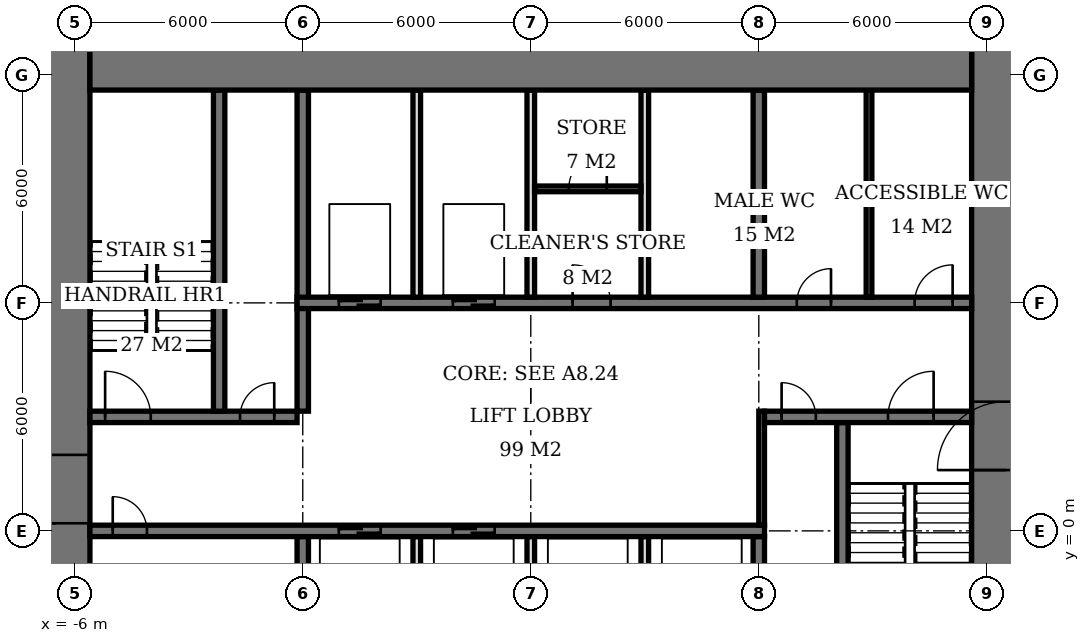
"""IFC4 building model, lengths in metres.
Left out: names, types, materials, properties, quantities, classifications, styles, units other than length and angle.
Written with IfcOpenShell. Run it as: python <this file> out.ifc"""

import sys

from ifc_helpers import new_model, si_unit, direction, frame, frame_2d, origin, place, context, subcontext, project, spatial, rectangle, extrude, element, fill, save


model = new_model("IFC4")
c1 = context("Model", 3, precision=1e-05, world=origin(), true_north=direction((0.0, 1.0)))
c2 = subcontext(c1, "Body", "Model", "MODEL_VIEW")
j1 = project(units=[si_unit("LENGTHUNIT", "METRE"), si_unit("PLANEANGLEUNIT", "RADIAN")], contexts=[c1])
p1 = place(None, origin())
s1 = spatial("IfcSite", under=j1, at=p1, CompositionType="ELEMENT")
p2 = place(p1, origin())
s2 = spatial("IfcBuilding", under=s1, at=p2, CompositionType="ELEMENT")
p3 = place(p2, frame((0.0, 0.0, 160.1)))
s3 = spatial("IfcBuildingStorey", under=s2, at=p3, CompositionType="ELEMENT", Elevation=160.1)
p4 = place(p3, frame((-5.6, 12.6, 0.0), z_axis=(0.0, 0.0, 1.0), x_axis=(1.0, 0.0, 0.0)))
e1 = element("IfcWall", 1, at=p4, inside=s3, PredefinedType="SHEAR", context=c2, shape_type="SweptSolid", body=[
    extrude(rectangle(XDim=23.2, YDim=2.0, at=frame_2d((11.6, 0.0))), origin(), (0.0, 0.0, 1.0), 3.9),
])
p5 = place(p3, frame((-6.5, -7.6, 0.0), z_axis=(0.0, 0.0, 1.0), x_axis=(0.0, 1.0, 0.0)))
e2 = element("IfcWall", 2, at=p5, inside=s3, PredefinedType="SHEAR", context=c2, shape_type="SweptSolid", body=[
    extrude(rectangle(XDim=21.2, YDim=1.8, at=frame_2d((10.6, 0.0))), origin(), (0.0, 0.0, 1.0), 3.9),
])
p6 = place(p5, frame((7.8, 0.0, 0.0)))
e3 = element("IfcOpeningElement", 3, at=p6, cuts=e2, PredefinedType="OPENING", context=c2, shape_type="SweptSolid", body=[
    extrude(rectangle(XDim=1.8, YDim=2.4, at=frame_2d((0.9, 1.2))), frame((0.0, 0.91, 0.0), z_axis=(0.0, -1.0, 0.0), x_axis=(1.0, 0.0, 0.0)), (0.0, 0.0, 1.0), 1.82),
])
p7 = place(p3, frame((18.5, -7.6, 0.0), z_axis=(0.0, 0.0, 1.0), x_axis=(0.0, 1.0, 0.0)))
e4 = element("IfcWall", 4, at=p7, inside=s3, PredefinedType="SHEAR", context=c2, shape_type="SweptSolid", body=[
    extrude(rectangle(XDim=21.2, YDim=1.8, at=frame_2d((10.6, 0.0))), origin(), (0.0, 0.0, 1.0), 3.9),
])
p8 = place(p7, frame((9.2, 0.0, 0.0)))
e5 = element("IfcOpeningElement", 5, at=p8, cuts=e4, PredefinedType="OPENING", context=c2, shape_type="SweptSolid", body=[
    extrude(rectangle(XDim=1.8, YDim=2.4, at=frame_2d((0.9, 1.2))), frame((0.0, 0.91, 0.0), z_axis=(0.0, -1.0, 0.0), x_axis=(1.0, 0.0, 0.0)), (0.0, 0.0, 1.0), 1.82),
])
p9 = place(p3, frame((-5.6, 0.0, 0.0), z_axis=(0.0, 0.0, 1.0), x_axis=(1.0, 0.0, 0.0)))
e6 = element("IfcWall", 6, at=p9, inside=s3, PredefinedType="SHEAR", context=c2, shape_type="SweptSolid", body=[
    extrude(rectangle(XDim=17.75, YDim=0.3, at=frame_2d((8.875, 0.0))), origin(), (0.0, 0.0, 1.0), 3.9),
])
p10 = place(p9, frame((0.6, 0.0, 0.0)))
e7 = element("IfcOpeningElement", 7, at=p10, cuts=e6, PredefinedType="OPENING", context=c2, shape_type="SweptSolid", body=[
    extrude(rectangle(XDim=0.9, YDim=2.1, at=frame_2d((0.45, 1.05))), frame((0.0, 0.16, 0.0), z_axis=(0.0, -1.0, 0.0), x_axis=(1.0, 0.0, 0.0)), (0.0, 0.0, 1.0), 0.32),
])
p11 = place(p9, frame((6.55, 0.0, 0.0)))
e8 = element("IfcOpeningElement", 8, at=p11, cuts=e6, PredefinedType="OPENING", context=c2, shape_type="SweptSolid", body=[
    extrude(rectangle(XDim=1.1, YDim=2.1, at=frame_2d((0.55, 1.05))), frame((0.0, 0.16, 0.0), z_axis=(0.0, -1.0, 0.0), x_axis=(1.0, 0.0, 0.0)), (0.0, 0.0, 1.0), 0.32),
])
p12 = place(p9, frame((9.55, 0.0, 0.0)))
e9 = element("IfcOpeningElement", 9, at=p12, cuts=e6, PredefinedType="OPENING", context=c2, shape_type="SweptSolid", body=[
    extrude(rectangle(XDim=1.1, YDim=2.1, at=frame_2d((0.55, 1.05))), frame((0.0, 0.16, 0.0), z_axis=(0.0, -1.0, 0.0), x_axis=(1.0, 0.0, 0.0)), (0.0, 0.0, 1.0), 0.32),
])
p13 = place(p3, frame((-5.6, 3.0, 0.0), z_axis=(0.0, 0.0, 1.0), x_axis=(1.0, 0.0, 0.0)))
e10 = element("IfcWall", 10, at=p13, inside=s3, PredefinedType="SHEAR", context=c2, shape_type="SweptSolid", body=[
    extrude(rectangle(XDim=5.45, YDim=0.3, at=frame_2d((2.725, 0.0))), origin(), (0.0, 0.0, 1.0), 3.9),
])
p14 = place(p13, frame((0.4, 0.0, 0.0)))
e11 = element("IfcOpeningElement", 11, at=p14, cuts=e10, PredefinedType="OPENING", context=c2, shape_type="SweptSolid", body=[
    extrude(rectangle(XDim=1.2, YDim=2.1, at=frame_2d((0.6, 1.05))), frame((0.0, 0.16, 0.0), z_axis=(0.0, -1.0, 0.0), x_axis=(1.0, 0.0, 0.0)), (0.0, 0.0, 1.0), 0.32),
])
p15 = place(p13, frame((3.95, 0.0, 0.0)))
e12 = element("IfcOpeningElement", 12, at=p15, cuts=e10, PredefinedType="OPENING", context=c2, shape_type="SweptSolid", body=[
    extrude(rectangle(XDim=0.9, YDim=2.1, at=frame_2d((0.45, 1.05))), frame((0.0, 0.16, 0.0), z_axis=(0.0, -1.0, 0.0), x_axis=(1.0, 0.0, 0.0)), (0.0, 0.0, 1.0), 0.32),
])
p16 = place(p3, frame((12.15, 3.0, 0.0), z_axis=(0.0, 0.0, 1.0), x_axis=(1.0, 0.0, 0.0)))
e13 = element("IfcWall", 13, at=p16, inside=s3, PredefinedType="SHEAR", context=c2, shape_type="SweptSolid", body=[
    extrude(rectangle(XDim=5.45, YDim=0.3, at=frame_2d((2.725, 0.0))), origin(), (0.0, 0.0, 1.0), 3.9),
])
p17 = place(p16, frame((3.25, 0.0, 0.0)))
e14 = element("IfcOpeningElement", 14, at=p17, cuts=e13, PredefinedType="OPENING", context=c2, shape_type="SweptSolid", body=[
    extrude(rectangle(XDim=1.2, YDim=2.1, at=frame_2d((0.6, 1.05))), frame((0.0, 0.16, 0.0), z_axis=(0.0, -1.0, 0.0), x_axis=(1.0, 0.0, 0.0)), (0.0, 0.0, 1.0), 0.32),
])
p18 = place(p16, frame((0.45, 0.0, 0.0)))
e15 = element("IfcOpeningElement", 15, at=p18, cuts=e13, PredefinedType="OPENING", context=c2, shape_type="SweptSolid", body=[
    extrude(rectangle(XDim=0.9, YDim=2.1, at=frame_2d((0.45, 1.05))), frame((0.0, 0.16, 0.0), z_axis=(0.0, -1.0, 0.0), x_axis=(1.0, 0.0, 0.0)), (0.0, 0.0, 1.0), 0.32),
])
p19 = place(p3, frame((-0.15, 6.0, 0.0), z_axis=(0.0, 0.0, 1.0), x_axis=(1.0, 0.0, 0.0)))
e16 = element("IfcWall", 16, at=p19, inside=s3, PredefinedType="SHEAR", context=c2, shape_type="SweptSolid", body=[
    extrude(rectangle(XDim=17.75, YDim=0.3, at=frame_2d((8.875, 0.0))), origin(), (0.0, 0.0, 1.0), 3.9),
])
p20 = place(p19, frame((13.15, 0.0, 0.0)))
e17 = element("IfcOpeningElement", 17, at=p20, cuts=e16, PredefinedType="OPENING", context=c2, shape_type="SweptSolid", body=[
    extrude(rectangle(XDim=0.9, YDim=2.1, at=frame_2d((0.45, 1.05))), frame((0.0, 0.16, 0.0), z_axis=(0.0, -1.0, 0.0), x_axis=(1.0, 0.0, 0.0)), (0.0, 0.0, 1.0), 0.32),
])
p21 = place(p19, frame((16.25, 0.0, 0.0)))
e18 = element("IfcOpeningElement", 18, at=p21, cuts=e16, PredefinedType="OPENING", context=c2, shape_type="SweptSolid", body=[
    extrude(rectangle(XDim=1.0, YDim=2.1, at=frame_2d((0.5, 1.05))), frame((0.0, 0.16, 0.0), z_axis=(0.0, -1.0, 0.0), x_axis=(1.0, 0.0, 0.0)), (0.0, 0.0, 1.0), 0.32),
])
p22 = place(p19, frame((7.25, 0.0, 0.0)))
e19 = element("IfcOpeningElement", 19, at=p22, cuts=e16, PredefinedType="OPENING", context=c2, shape_type="SweptSolid", body=[
    extrude(rectangle(XDim=1.0, YDim=2.1, at=frame_2d((0.5, 1.05))), frame((0.0, 0.16, 0.0), z_axis=(0.0, -1.0, 0.0), x_axis=(1.0, 0.0, 0.0)), (0.0, 0.0, 1.0), 0.32),
])
p23 = place(p19, frame((1.1, 0.0, 0.0)))
e20 = element("IfcOpeningElement", 20, at=p23, cuts=e16, PredefinedType="OPENING", context=c2, shape_type="SweptSolid", body=[
    extrude(rectangle(XDim=1.1, YDim=2.1, at=frame_2d((0.55, 1.05))), frame((0.0, 0.16, 0.0), z_axis=(0.0, -1.0, 0.0), x_axis=(1.0, 0.0, 0.0)), (0.0, 0.0, 1.0), 0.32),
])
p24 = place(p19, frame((4.1, 0.0, 0.0)))
e21 = element("IfcOpeningElement", 21, at=p24, cuts=e16, PredefinedType="OPENING", context=c2, shape_type="SweptSolid", body=[
    extrude(rectangle(XDim=1.1, YDim=2.1, at=frame_2d((0.55, 1.05))), frame((0.0, 0.16, 0.0), z_axis=(0.0, -1.0, 0.0), x_axis=(1.0, 0.0, 0.0)), (0.0, 0.0, 1.0), 0.32),
])
p25 = place(p3, frame((0.0, -5.6, 0.0), z_axis=(0.0, 0.0, 1.0), x_axis=(0.0, 1.0, 0.0)))
e22 = element("IfcWall", 22, at=p25, inside=s3, PredefinedType="SHEAR", context=c2, shape_type="SweptSolid", body=[
    extrude(rectangle(XDim=5.45, YDim=0.3, at=frame_2d((2.725, 0.0))), origin(), (0.0, 0.0, 1.0), 3.9),
])
p26 = place(p3, frame((0.0, 3.15, 0.0), z_axis=(0.0, 0.0, 1.0), x_axis=(0.0, 1.0, 0.0)))
e23 = element("IfcWall", 23, at=p26, inside=s3, PredefinedType="SHEAR", context=c2, shape_type="SweptSolid", body=[
    extrude(rectangle(XDim=8.45, YDim=0.3, at=frame_2d((4.225, 0.0))), origin(), (0.0, 0.0, 1.0), 3.9),
])
for number, where, z_axis, x_axis in (
    (24, (12.0, -5.6, 0.0), (0.0, 0.0, 1.0), (0.0, 1.0, 0.0)),
    (25, (12.0, 6.15, 0.0), (0.0, 0.0, 1.0), (0.0, 1.0, 0.0)),
):
    element("IfcWall", number, at=place(p3, frame(where, z_axis=z_axis, x_axis=x_axis)), inside=s3, PredefinedType="SHEAR", context=c2, shape_type="SweptSolid", body=[
        extrude(rectangle(XDim=5.45, YDim=0.3, at=frame_2d((2.725, 0.0))), origin(), (0.0, 0.0, 1.0), 3.9),
    ])
for number, where, z_axis, x_axis in (
    (26, (-2.2, 3.15, 0.0), (0.0, 0.0, 1.0), (0.0, 1.0, 0.0)),
    (27, (14.2, -5.6, 0.0), (0.0, 0.0, 1.0), (0.0, 1.0, 0.0)),
):
    element("IfcWall", number, at=place(p3, frame(where, z_axis=z_axis, x_axis=x_axis)), inside=s3, PredefinedType="SHEAR", context=c2, shape_type="SweptSolid", body=[
        extrude(rectangle(XDim=8.45, YDim=0.3, at=frame_2d((4.225, 0.0))), origin(), (0.0, 0.0, 1.0), 3.9),
    ])
for number, where, z_axis, x_axis in (
    (28, (3.0, 6.15, 0.0), (0.0, 0.0, 1.0), (0.0, 1.0, 0.0)),
    (29, (6.0, 6.15, 0.0), (0.0, 0.0, 1.0), (0.0, 1.0, 0.0)),
    (30, (9.0, 6.15, 0.0), (0.0, 0.0, 1.0), (0.0, 1.0, 0.0)),
    (31, (3.0, -5.6, 0.0), (0.0, 0.0, 1.0), (0.0, 1.0, 0.0)),
    (32, (6.0, -5.6, 0.0), (0.0, 0.0, 1.0), (0.0, 1.0, 0.0)),
    (33, (9.0, -5.6, 0.0), (0.0, 0.0, 1.0), (0.0, 1.0, 0.0)),
):
    element("IfcWall", number, at=place(p3, frame(where, z_axis=z_axis, x_axis=x_axis)), inside=s3, PredefinedType="SOLIDWALL", context=c2, shape_type="SweptSolid", body=[
        extrude(rectangle(XDim=5.45, YDim=0.2, at=frame_2d((2.725, 0.0))), origin(), (0.0, 0.0, 1.0), 3.9),
    ])
p27 = place(p3, frame((14.9, 6.15, 0.0), z_axis=(0.0, 0.0, 1.0), x_axis=(0.0, 1.0, 0.0)))
e34 = element("IfcWall", 34, at=p27, inside=s3, PredefinedType="PLUMBINGWALL", context=c2, shape_type="SweptSolid", body=[
    extrude(rectangle(XDim=5.45, YDim=0.15, at=frame_2d((2.725, 0.0))), origin(), (0.0, 0.0, 1.0), 3.65),
])
p28 = place(p3, frame((6.1, 9.0, 0.0), z_axis=(0.0, 0.0, 1.0), x_axis=(1.0, 0.0, 0.0)))
e35 = element("IfcWall", 35, at=p28, inside=s3, PredefinedType="PARTITIONING", context=c2, shape_type="SweptSolid", body=[
    extrude(rectangle(XDim=2.8, YDim=0.15, at=frame_2d((1.4, 0.0))), origin(), (0.0, 0.0, 1.0), 3.65),
])
p29 = place(p28, frame((0.9, 0.0, 0.0)))
e36 = element("IfcOpeningElement", 36, at=p29, cuts=e35, PredefinedType="OPENING", context=c2, shape_type="SweptSolid", body=[
    extrude(rectangle(XDim=1.0, YDim=2.1, at=frame_2d((0.5, 1.05))), frame((0.0, 0.085, 0.0), z_axis=(0.0, -1.0, 0.0), x_axis=(1.0, 0.0, 0.0)), (0.0, 0.0, 1.0), 0.17),
])
p30 = place(p3, frame((12.075, 0.15, 0.0), z_axis=(0.0, 0.0, 1.0), x_axis=(0.0, 1.0, 0.0)))
e37 = element("IfcWall", 37, at=p30, inside=s3, PredefinedType="PARTITIONING", context=c2, shape_type="SweptSolid", body=[
    extrude(rectangle(XDim=3.0, YDim=0.15, at=frame_2d((1.5, 0.0))), origin(), (0.0, 0.0, 1.0), 3.65),
])
p31 = place(p6, origin())
e38 = element("IfcDoor", 38, at=p31, inside=s3, OperationType="DOUBLE_DOOR_SINGLE_SWING", PredefinedType="DOOR", context=c2, shape_type="SweptSolid", body=[
    extrude(rectangle(XDim=1.8, YDim=2.4, at=frame_2d((0.9, 1.2))), frame((0.0, 0.025, 0.0), z_axis=(0.0, -1.0, 0.0), x_axis=(1.0, 0.0, 0.0)), (0.0, 0.0, 1.0), 0.05),
])
fill(e3, e38)
p32 = place(p8, origin())
e39 = element("IfcDoor", 39, at=p32, inside=s3, OperationType="DOUBLE_DOOR_SINGLE_SWING", PredefinedType="DOOR", context=c2, shape_type="SweptSolid", body=[
    extrude(rectangle(XDim=1.8, YDim=2.4, at=frame_2d((0.9, 1.2))), frame((0.0, 0.025, 0.0), z_axis=(0.0, -1.0, 0.0), x_axis=(1.0, 0.0, 0.0)), (0.0, 0.0, 1.0), 0.05),
])
fill(e5, e39)
p33 = place(p14, origin())
e40 = element("IfcDoor", 40, at=p33, inside=s3, OperationType="SINGLE_SWING_LEFT", PredefinedType="DOOR", context=c2, shape_type="SweptSolid", body=[
    extrude(rectangle(XDim=1.2, YDim=2.1, at=frame_2d((0.6, 1.05))), frame((0.0, 0.025, 0.0), z_axis=(0.0, -1.0, 0.0), x_axis=(1.0, 0.0, 0.0)), (0.0, 0.0, 1.0), 0.05),
])
fill(e11, e40)
p34 = place(p15, origin())
e41 = element("IfcDoor", 41, at=p34, inside=s3, OperationType="SINGLE_SWING_RIGHT", PredefinedType="DOOR", context=c2, shape_type="SweptSolid", body=[
    extrude(rectangle(XDim=0.9, YDim=2.1, at=frame_2d((0.45, 1.05))), frame((0.0, 0.025, 0.0), z_axis=(0.0, -1.0, 0.0), x_axis=(1.0, 0.0, 0.0)), (0.0, 0.0, 1.0), 0.05),
])
fill(e12, e41)
p35 = place(p17, origin())
e42 = element("IfcDoor", 42, at=p35, inside=s3, OperationType="SINGLE_SWING_RIGHT", PredefinedType="DOOR", context=c2, shape_type="SweptSolid", body=[
    extrude(rectangle(XDim=1.2, YDim=2.1, at=frame_2d((0.6, 1.05))), frame((0.0, 0.025, 0.0), z_axis=(0.0, -1.0, 0.0), x_axis=(1.0, 0.0, 0.0)), (0.0, 0.0, 1.0), 0.05),
])
fill(e14, e42)
p36 = place(p18, origin())
e43 = element("IfcDoor", 43, at=p36, inside=s3, OperationType="SINGLE_SWING_LEFT", PredefinedType="DOOR", context=c2, shape_type="SweptSolid", body=[
    extrude(rectangle(XDim=0.9, YDim=2.1, at=frame_2d((0.45, 1.05))), frame((0.0, 0.025, 0.0), z_axis=(0.0, -1.0, 0.0), x_axis=(1.0, 0.0, 0.0)), (0.0, 0.0, 1.0), 0.05),
])
fill(e15, e43)
p37 = place(p10, origin())
e44 = element("IfcDoor", 44, at=p37, inside=s3, OperationType="SINGLE_SWING_LEFT", PredefinedType="DOOR", context=c2, shape_type="SweptSolid", body=[
    extrude(rectangle(XDim=0.9, YDim=2.1, at=frame_2d((0.45, 1.05))), frame((0.0, 0.025, 0.0), z_axis=(0.0, -1.0, 0.0), x_axis=(1.0, 0.0, 0.0)), (0.0, 0.0, 1.0), 0.05),
])
fill(e7, e44)
p38 = place(p20, origin())
e45 = element("IfcDoor", 45, at=p38, inside=s3, OperationType="SINGLE_SWING_RIGHT", PredefinedType="DOOR", context=c2, shape_type="SweptSolid", body=[
    extrude(rectangle(XDim=0.9, YDim=2.1, at=frame_2d((0.45, 1.05))), frame((0.0, 0.025, 0.0), z_axis=(0.0, -1.0, 0.0), x_axis=(1.0, 0.0, 0.0)), (0.0, 0.0, 1.0), 0.05),
])
fill(e17, e45)
p39 = place(p21, origin())
e46 = element("IfcDoor", 46, at=p39, inside=s3, OperationType="SINGLE_SWING_RIGHT", PredefinedType="DOOR", context=c2, shape_type="SweptSolid", body=[
    extrude(rectangle(XDim=1.0, YDim=2.1, at=frame_2d((0.5, 1.05))), frame((0.0, 0.025, 0.0), z_axis=(0.0, -1.0, 0.0), x_axis=(1.0, 0.0, 0.0)), (0.0, 0.0, 1.0), 0.05),
])
fill(e18, e46)
p40 = place(p29, origin())
e47 = element("IfcDoor", 47, at=p40, inside=s3, OperationType="SINGLE_SWING_RIGHT", PredefinedType="DOOR", context=c2, shape_type="SweptSolid", body=[
    extrude(rectangle(XDim=1.0, YDim=2.1, at=frame_2d((0.5, 1.05))), frame((0.0, 0.025, 0.0), z_axis=(0.0, -1.0, 0.0), x_axis=(1.0, 0.0, 0.0)), (0.0, 0.0, 1.0), 0.05),
])
fill(e36, e47)
p41 = place(p22, origin())
e48 = element("IfcDoor", 48, at=p41, inside=s3, OperationType="SINGLE_SWING_LEFT", PredefinedType="DOOR", context=c2, shape_type="SweptSolid", body=[
    extrude(rectangle(XDim=1.0, YDim=2.1, at=frame_2d((0.5, 1.05))), frame((0.0, 0.025, 0.0), z_axis=(0.0, -1.0, 0.0), x_axis=(1.0, 0.0, 0.0)), (0.0, 0.0, 1.0), 0.05),
])
fill(e19, e48)
p42 = place(p23, origin())
e49 = element("IfcDoor", 49, at=p42, inside=s3, OperationType="DOUBLE_DOOR_SLIDING", PredefinedType="USERDEFINED", context=c2, shape_type="SweptSolid", body=[
    extrude(rectangle(XDim=1.1, YDim=2.1, at=frame_2d((0.55, 1.05))), frame((0.0, 0.025, 0.0), z_axis=(0.0, -1.0, 0.0), x_axis=(1.0, 0.0, 0.0)), (0.0, 0.0, 1.0), 0.05),
])
fill(e20, e49)
p43 = place(p24, origin())
e50 = element("IfcDoor", 50, at=p43, inside=s3, OperationType="DOUBLE_DOOR_SLIDING", PredefinedType="USERDEFINED", context=c2, shape_type="SweptSolid", body=[
    extrude(rectangle(XDim=1.1, YDim=2.1, at=frame_2d((0.55, 1.05))), frame((0.0, 0.025, 0.0), z_axis=(0.0, -1.0, 0.0), x_axis=(1.0, 0.0, 0.0)), (0.0, 0.0, 1.0), 0.05),
])
fill(e21, e50)
p44 = place(p11, origin())
e51 = element("IfcDoor", 51, at=p44, inside=s3, OperationType="DOUBLE_DOOR_SLIDING", PredefinedType="USERDEFINED", context=c2, shape_type="SweptSolid", body=[
    extrude(rectangle(XDim=1.1, YDim=2.1, at=frame_2d((0.55, 1.05))), frame((0.0, 0.025, 0.0), z_axis=(0.0, -1.0, 0.0), x_axis=(1.0, 0.0, 0.0)), (0.0, 0.0, 1.0), 0.05),
])
fill(e8, e51)
p45 = place(p12, origin())
e52 = element("IfcDoor", 52, at=p45, inside=s3, OperationType="DOUBLE_DOOR_SLIDING", PredefinedType="USERDEFINED", context=c2, shape_type="SweptSolid", body=[
    extrude(rectangle(XDim=1.1, YDim=2.1, at=frame_2d((0.55, 1.05))), frame((0.0, 0.025, 0.0), z_axis=(0.0, -1.0, 0.0), x_axis=(1.0, 0.0, 0.0)), (0.0, 0.0, 1.0), 0.05),
])
fill(e9, e52)
save(model, sys.argv[1])
